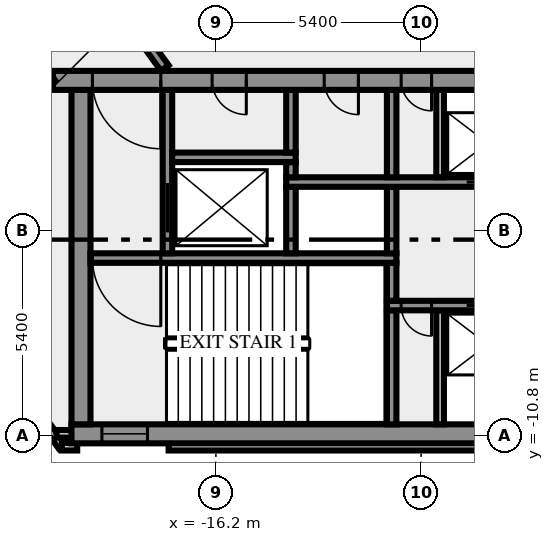
"""IFC4 building model, lengths in metres.
Left out: names, types, materials, properties, quantities, classifications, styles, units other than length and angle.
Written with IfcOpenShell. Run it as: python <this file> out.ifc"""

import sys

from ifc_helpers import new_model, si_unit, direction, frame, frame_2d, origin, place, context, subcontext, project, spatial, rectangle, extrude, element, fill, save


model = new_model("IFC4")
c1 = context("Model", 3, precision=1e-05, world=origin(), true_north=direction((0.0, 1.0)))
c2 = subcontext(c1, "Body", "Model", "MODEL_VIEW")
j1 = project(units=[si_unit("LENGTHUNIT", "METRE"), si_unit("PLANEANGLEUNIT", "RADIAN")], contexts=[c1])
p1 = place(None, origin())
s1 = spatial("IfcSite", under=j1, at=p1, CompositionType="ELEMENT")
p2 = place(p1, origin())
s2 = spatial("IfcBuilding", under=s1, at=p2, CompositionType="ELEMENT")
p3 = place(p2, frame((0.0, 0.0, 323.0)))
s3 = spatial("IfcBuildingStorey", under=s2, at=p3, CompositionType="ELEMENT", Elevation=323.0)
p4 = place(p3, frame((-21.833, -8.909, 0.0), z_axis=(0.0, 0.0, 1.0), x_axis=(0.587766567315, -0.809030569476, 0.0)))
e1 = element("IfcWall", 1, at=p4, inside=s3, PredefinedType="SOLIDWALL", context=c2, shape_type="SweptSolid", body=[
    extrude(rectangle(XDim=2.688, YDim=0.2, at=frame_2d((1.344, 0.0))), origin(), (0.0, 0.0, 1.0), 3.65),
])
p5 = place(p3, frame((-20.256, -11.088, 0.0), z_axis=(0.0, 0.0, 1.0), x_axis=(1.0, 0.0, 0.0)))
e2 = element("IfcWall", 2, at=p5, inside=s3, PredefinedType="SOLIDWALL", context=c2, shape_type="SweptSolid", body=[
    extrude(rectangle(XDim=0.406, YDim=0.2, at=frame_2d((0.203, 0.0))), origin(), (0.0, 0.0, 1.0), 3.65),
])
p6 = place(p3, frame((-17.444, -11.088, 0.0), z_axis=(0.0, 0.0, 1.0), x_axis=(1.0, 0.0, 0.0)))
e3 = element("IfcWall", 3, at=p6, inside=s3, PredefinedType="SOLIDWALL", context=c2, shape_type="SweptSolid", body=[
    extrude(rectangle(XDim=34.888, YDim=0.2, at=frame_2d((17.444, 0.0))), origin(), (0.0, 0.0, 1.0), 3.65),
])
p7 = place(p3, frame((-19.98, -10.75, 0.0), z_axis=(0.0, 0.0, 1.0), x_axis=(-1.0, 0.0, 0.0)))
e4 = element("IfcWall", 4, at=p7, inside=s3, PredefinedType="SOLIDWALL", context=c2, shape_type="SweptSolid", body=[
    extrude(rectangle(XDim=0.417, YDim=0.2, at=frame_2d((0.208, 0.0))), origin(), (0.0, 0.0, 1.0), 3.65),
])
p8 = place(p3, frame((-20.0, -10.75, 0.0), z_axis=(0.0, 0.0, 1.0), x_axis=(1.0, 0.0, 0.0)))
e5 = element("IfcWall", 5, at=p8, inside=s3, PredefinedType="SHEAR", context=c2, shape_type="SweptSolid", body=[
    extrude(rectangle(XDim=40.0, YDim=0.5, at=frame_2d((20.0, 0.0))), origin(), (0.0, 0.0, 1.0), 3.65),
])
p9 = place(p8, frame((0.8, 0.0, 1.0)))
e6 = element("IfcOpeningElement", 6, at=p9, cuts=e5, PredefinedType="OPENING", context=c2, shape_type="SweptSolid", body=[
    extrude(rectangle(XDim=1.2, YDim=1.2, at=frame_2d((0.6, 0.6))), frame((0.0, 0.26, 0.0), z_axis=(0.0, -1.0, 0.0), x_axis=(1.0, 0.0, 0.0)), (0.0, 0.0, 1.0), 0.52),
])
p10 = place(p8, frame((38.0, 0.0, 1.0)))
e7 = element("IfcOpeningElement", 7, at=p10, cuts=e5, PredefinedType="OPENING", context=c2, shape_type="SweptSolid", body=[
    extrude(rectangle(XDim=1.2, YDim=1.2, at=frame_2d((0.6, 0.6))), frame((0.0, 0.26, 0.0), z_axis=(0.0, -1.0, 0.0), x_axis=(1.0, 0.0, 0.0)), (0.0, 0.0, 1.0), 0.52),
])
p11 = place(p3, frame((-19.75, -10.5, 0.0), z_axis=(0.0, 0.0, 1.0), x_axis=(0.0, 1.0, 0.0)))
e8 = element("IfcWall", 8, at=p11, inside=s3, PredefinedType="SHEAR", context=c2, shape_type="SweptSolid", body=[
    extrude(rectangle(XDim=8.8, YDim=0.5, at=frame_2d((4.4, 0.0))), origin(), (0.0, 0.0, 1.0), 3.65),
])
p12 = place(p3, frame((-11.575, -10.5, 0.0), z_axis=(0.0, 0.0, 1.0), x_axis=(0.0, 1.0, 0.0)))
e9 = element("IfcWall", 9, at=p12, inside=s3, PredefinedType="SHEAR", context=c2, shape_type="SweptSolid", body=[
    extrude(rectangle(XDim=3.0, YDim=0.25, at=frame_2d((1.5, 0.0))), origin(), (0.0, 0.0, 1.0), 3.65),
])
p13 = place(p3, frame((-10.3, -10.5, 0.0), z_axis=(0.0, 0.0, 1.0), x_axis=(0.0, 1.0, 0.0)))
e10 = element("IfcWall", 10, at=p13, inside=s3, PredefinedType="SOLIDWALL", context=c2, shape_type="SweptSolid", body=[
    extrude(rectangle(XDim=3.0, YDim=0.2, at=frame_2d((1.5, 0.0))), origin(), (0.0, 0.0, 1.0), 3.65),
])
p14 = place(p3, frame((11.7, -7.375, 0.0), z_axis=(0.0, 0.0, 1.0), x_axis=(-1.0, 0.0, 0.0)))
e11 = element("IfcWall", 11, at=p14, inside=s3, PredefinedType="SHEAR", context=c2, shape_type="SweptSolid", body=[
    extrude(rectangle(XDim=23.4, YDim=0.25, at=frame_2d((11.7, 0.0))), origin(), (0.0, 0.0, 1.0), 3.65),
])
p15 = place(p14, frame((22.225, 0.0, 0.0)))
e12 = element("IfcOpeningElement", 12, at=p15, cuts=e11, PredefinedType="OPENING", context=c2, shape_type="SweptSolid", body=[
    extrude(rectangle(XDim=0.8, YDim=2.1, at=frame_2d((0.4, 1.05))), frame((0.0, 0.135, 0.0), z_axis=(0.0, -1.0, 0.0), x_axis=(1.0, 0.0, 0.0)), (0.0, 0.0, 1.0), 0.27),
])
p16 = place(p14, frame((20.2, 0.0, 0.0)))
e13 = element("IfcOpeningElement", 13, at=p16, cuts=e11, PredefinedType="OPENING", context=c2, shape_type="SweptSolid", body=[
    extrude(rectangle(XDim=1.1, YDim=2.1, at=frame_2d((0.55, 1.05))), frame((0.0, 0.135, 0.0), z_axis=(0.0, -1.0, 0.0), x_axis=(1.0, 0.0, 0.0)), (0.0, 0.0, 1.0), 0.27),
])
p17 = place(p14, frame((17.7, 0.0, 0.0)))
e14 = element("IfcOpeningElement", 14, at=p17, cuts=e11, PredefinedType="OPENING", context=c2, shape_type="SweptSolid", body=[
    extrude(rectangle(XDim=1.1, YDim=2.1, at=frame_2d((0.55, 1.05))), frame((0.0, 0.135, 0.0), z_axis=(0.0, -1.0, 0.0), x_axis=(1.0, 0.0, 0.0)), (0.0, 0.0, 1.0), 0.27),
])
p18 = place(p14, frame((15.975, 0.0, 0.0)))
e15 = element("IfcOpeningElement", 15, at=p18, cuts=e11, PredefinedType="OPENING", context=c2, shape_type="SweptSolid", body=[
    extrude(rectangle(XDim=0.8, YDim=2.1, at=frame_2d((0.4, 1.05))), frame((0.0, 0.135, 0.0), z_axis=(0.0, -1.0, 0.0), x_axis=(1.0, 0.0, 0.0)), (0.0, 0.0, 1.0), 0.27),
])
p19 = place(p14, frame((14.5, 0.0, 0.0)))
e16 = element("IfcOpeningElement", 16, at=p19, cuts=e11, PredefinedType="OPENING", context=c2, shape_type="SweptSolid", body=[
    extrude(rectangle(XDim=0.9, YDim=2.1, at=frame_2d((0.45, 1.05))), frame((0.0, 0.135, 0.0), z_axis=(0.0, -1.0, 0.0), x_axis=(1.0, 0.0, 0.0)), (0.0, 0.0, 1.0), 0.27),
])
p20 = place(p14, frame((12.95, 0.0, 0.0)))
e17 = element("IfcOpeningElement", 17, at=p20, cuts=e11, PredefinedType="OPENING", context=c2, shape_type="SweptSolid", body=[
    extrude(rectangle(XDim=0.9, YDim=2.1, at=frame_2d((0.45, 1.05))), frame((0.0, 0.135, 0.0), z_axis=(0.0, -1.0, 0.0), x_axis=(1.0, 0.0, 0.0)), (0.0, 0.0, 1.0), 0.27),
])
p21 = place(p14, frame((11.475, 0.0, 0.0)))
e18 = element("IfcOpeningElement", 18, at=p21, cuts=e11, PredefinedType="OPENING", context=c2, shape_type="SweptSolid", body=[
    extrude(rectangle(XDim=0.9, YDim=2.1, at=frame_2d((0.45, 1.05))), frame((0.0, 0.135, 0.0), z_axis=(0.0, -1.0, 0.0), x_axis=(1.0, 0.0, 0.0)), (0.0, 0.0, 1.0), 0.27),
])
p22 = place(p14, frame((10.45, 0.0, 0.0)))
e19 = element("IfcOpeningElement", 19, at=p22, cuts=e11, PredefinedType="OPENING", context=c2, shape_type="SweptSolid", body=[
    extrude(rectangle(XDim=0.5, YDim=2.1, at=frame_2d((0.25, 1.05))), frame((0.0, 0.135, 0.0), z_axis=(0.0, -1.0, 0.0), x_axis=(1.0, 0.0, 0.0)), (0.0, 0.0, 1.0), 0.27),
])
p23 = place(p14, frame((7.713, 0.0, 0.0)))
e20 = element("IfcOpeningElement", 20, at=p23, cuts=e11, PredefinedType="OPENING", context=c2, shape_type="SweptSolid", body=[
    extrude(rectangle(XDim=0.9, YDim=2.1, at=frame_2d((0.45, 1.05))), frame((0.0, 0.135, 0.0), z_axis=(0.0, -1.0, 0.0), x_axis=(1.0, 0.0, 0.0)), (0.0, 0.0, 1.0), 0.27),
])
p24 = place(p14, frame((4.15, 0.0, 0.0)))
e21 = element("IfcOpeningElement", 21, at=p24, cuts=e11, PredefinedType="OPENING", context=c2, shape_type="SweptSolid", body=[
    extrude(rectangle(XDim=0.9, YDim=2.1, at=frame_2d((0.45, 1.05))), frame((0.0, 0.135, 0.0), z_axis=(0.0, -1.0, 0.0), x_axis=(1.0, 0.0, 0.0)), (0.0, 0.0, 1.0), 0.27),
])
p25 = place(p14, frame((1.138, 0.0, 0.0)))
e22 = element("IfcOpeningElement", 22, at=p25, cuts=e11, PredefinedType="OPENING", context=c2, shape_type="SweptSolid", body=[
    extrude(rectangle(XDim=0.9, YDim=2.1, at=frame_2d((0.45, 1.05))), frame((0.0, 0.135, 0.0), z_axis=(0.0, -1.0, 0.0), x_axis=(1.0, 0.0, 0.0)), (0.0, 0.0, 1.0), 0.27),
])
p26 = place(p3, frame((-11.575, -7.25, 0.0), z_axis=(0.0, 0.0, 1.0), x_axis=(0.0, 1.0, 0.0)))
e23 = element("IfcWall", 23, at=p26, inside=s3, PredefinedType="SHEAR", context=c2, shape_type="SweptSolid", body=[
    extrude(rectangle(XDim=1.0, YDim=0.25, at=frame_2d((0.5, 0.0))), origin(), (0.0, 0.0, 1.0), 3.65),
])
p27 = place(p3, frame((-11.45, -6.125, 0.0), z_axis=(0.0, 0.0, 1.0), x_axis=(-1.0, 0.0, 0.0)))
e24 = element("IfcWall", 24, at=p27, inside=s3, PredefinedType="SHEAR", context=c2, shape_type="SweptSolid", body=[
    extrude(rectangle(XDim=8.05, YDim=0.25, at=frame_2d((4.025, 0.0))), origin(), (0.0, 0.0, 1.0), 3.65),
])
p28 = place(p27, frame((6.2, 0.0, 0.0)))
e25 = element("IfcOpeningElement", 25, at=p28, cuts=e24, PredefinedType="OPENING", context=c2, shape_type="SweptSolid", body=[
    extrude(rectangle(XDim=1.8, YDim=2.1, at=frame_2d((0.9, 1.05))), frame((0.0, 0.135, 0.0), z_axis=(0.0, -1.0, 0.0), x_axis=(1.0, 0.0, 0.0)), (0.0, 0.0, 1.0), 0.27),
])
p29 = place(p3, frame((-17.475, -6.0, 0.0), z_axis=(0.0, 0.0, 1.0), x_axis=(0.0, 1.0, 0.0)))
e26 = element("IfcWall", 26, at=p29, inside=s3, PredefinedType="SHEAR", context=c2, shape_type="SweptSolid", body=[
    extrude(rectangle(XDim=4.3, YDim=0.25, at=frame_2d((2.15, 0.0))), origin(), (0.0, 0.0, 1.0), 3.65),
])
p30 = place(p29, frame((0.55, 0.0, 0.0)))
e27 = element("IfcOpeningElement", 27, at=p30, cuts=e26, PredefinedType="OPENING", context=c2, shape_type="SweptSolid", body=[
    extrude(rectangle(XDim=1.3, YDim=2.1, at=frame_2d((0.65, 1.05))), frame((0.0, 0.135, 0.0), z_axis=(0.0, -1.0, 0.0), x_axis=(1.0, 0.0, 0.0)), (0.0, 0.0, 1.0), 0.27),
])
for number, where, z_axis, x_axis in (
    (28, (-14.225, -6.0, 0.0), (0.0, 0.0, 1.0), (0.0, 1.0, 0.0)),
    (29, (-11.575, -6.0, 0.0), (0.0, 0.0, 1.0), (0.0, 1.0, 0.0)),
):
    element("IfcWall", number, at=place(p3, frame(where, z_axis=z_axis, x_axis=x_axis)), inside=s3, PredefinedType="SHEAR", context=c2, shape_type="SweptSolid", body=[
        extrude(rectangle(XDim=1.75, YDim=0.25, at=frame_2d((0.875, 0.0))), origin(), (0.0, 0.0, 1.0), 3.65),
    ])
p31 = place(p3, frame((-14.35, -4.125, 0.0), z_axis=(0.0, 0.0, 1.0), x_axis=(1.0, 0.0, 0.0)))
e30 = element("IfcWall", 30, at=p31, inside=s3, PredefinedType="SHEAR", context=c2, shape_type="SweptSolid", body=[
    extrude(rectangle(XDim=10.4, YDim=0.25, at=frame_2d((5.2, 0.0))), origin(), (0.0, 0.0, 1.0), 3.65),
])
p32 = place(p31, frame((4.75, 0.0, 0.0)))
e31 = element("IfcOpeningElement", 31, at=p32, cuts=e30, PredefinedType="OPENING", context=c2, shape_type="SweptSolid", body=[
    extrude(rectangle(XDim=1.1, YDim=2.1, at=frame_2d((0.55, 1.05))), frame((0.0, 0.135, 0.0), z_axis=(0.0, -1.0, 0.0), x_axis=(1.0, 0.0, 0.0)), (0.0, 0.0, 1.0), 0.27),
])
p33 = place(p31, frame((7.25, 0.0, 0.0)))
e32 = element("IfcOpeningElement", 32, at=p33, cuts=e30, PredefinedType="OPENING", context=c2, shape_type="SweptSolid", body=[
    extrude(rectangle(XDim=1.1, YDim=2.1, at=frame_2d((0.55, 1.05))), frame((0.0, 0.135, 0.0), z_axis=(0.0, -1.0, 0.0), x_axis=(1.0, 0.0, 0.0)), (0.0, 0.0, 1.0), 0.27),
])
p34 = place(p3, frame((-14.225, -4.0, 0.0), z_axis=(0.0, 0.0, 1.0), x_axis=(0.0, 1.0, 0.0)))
e33 = element("IfcWall", 33, at=p34, inside=s3, PredefinedType="SHEAR", context=c2, shape_type="SweptSolid", body=[
    extrude(rectangle(XDim=0.4, YDim=0.25, at=frame_2d((0.2, 0.0))), origin(), (0.0, 0.0, 1.0), 3.65),
])
p35 = place(p3, frame((-11.575, -4.0, 0.0), z_axis=(0.0, 0.0, 1.0), x_axis=(0.0, 1.0, 0.0)))
e34 = element("IfcWall", 34, at=p35, inside=s3, PredefinedType="SHEAR", context=c2, shape_type="SweptSolid", body=[
    extrude(rectangle(XDim=2.3, YDim=0.25, at=frame_2d((1.15, 0.0))), origin(), (0.0, 0.0, 1.0), 3.65),
])
p36 = place(p3, frame((-10.3, -4.0, 0.0), z_axis=(0.0, 0.0, 1.0), x_axis=(0.0, 1.0, 0.0)))
e35 = element("IfcWall", 35, at=p36, inside=s3, PredefinedType="SOLIDWALL", context=c2, shape_type="SweptSolid", body=[
    extrude(rectangle(XDim=2.3, YDim=0.2, at=frame_2d((1.15, 0.0))), origin(), (0.0, 0.0, 1.0), 3.65),
])
p37 = place(p3, frame((-17.35, -3.475, 0.0), z_axis=(0.0, 0.0, 1.0), x_axis=(1.0, 0.0, 0.0)))
e36 = element("IfcWall", 36, at=p37, inside=s3, PredefinedType="SHEAR", context=c2, shape_type="SweptSolid", body=[
    extrude(rectangle(XDim=3.25, YDim=0.25, at=frame_2d((1.625, 0.0))), origin(), (0.0, 0.0, 1.0), 3.65),
])
p38 = place(p3, frame((-14.225, -3.35, 0.0), z_axis=(0.0, 0.0, 1.0), x_axis=(0.0, 1.0, 0.0)))
e37 = element("IfcWall", 37, at=p38, inside=s3, PredefinedType="SHEAR", context=c2, shape_type="SweptSolid", body=[
    extrude(rectangle(XDim=1.65, YDim=0.25, at=frame_2d((0.825, 0.0))), origin(), (0.0, 0.0, 1.0), 3.65),
])
p39 = place(p3, frame((20.49, -1.45, 0.0), z_axis=(0.0, 0.0, 1.0), x_axis=(-1.0, 0.0, 0.0)))
e38 = element("IfcWall", 38, at=p39, inside=s3, PredefinedType="SHEAR", context=c2, shape_type="SweptSolid", body=[
    extrude(rectangle(XDim=40.98, YDim=0.5, at=frame_2d((20.49, 0.0))), origin(), (0.0, 0.0, 1.0), 3.65),
])
p40 = place(p39, frame((38.14, 0.0, 0.0)))
e39 = element("IfcOpeningElement", 39, at=p40, cuts=e38, PredefinedType="OPENING", context=c2, shape_type="SweptSolid", body=[
    extrude(rectangle(XDim=1.8, YDim=2.1, at=frame_2d((0.9, 1.05))), frame((0.0, 0.26, 0.0), z_axis=(0.0, -1.0, 0.0), x_axis=(1.0, 0.0, 0.0)), (0.0, 0.0, 1.0), 0.52),
])
p41 = place(p39, frame((35.89, 0.0, 0.0)))
e40 = element("IfcOpeningElement", 40, at=p41, cuts=e38, PredefinedType="OPENING", context=c2, shape_type="SweptSolid", body=[
    extrude(rectangle(XDim=0.9, YDim=2.1, at=frame_2d((0.45, 1.05))), frame((0.0, 0.26, 0.0), z_axis=(0.0, -1.0, 0.0), x_axis=(1.0, 0.0, 0.0)), (0.0, 0.0, 1.0), 0.52),
])
p42 = place(p39, frame((32.94, 0.0, 0.0)))
e41 = element("IfcOpeningElement", 41, at=p42, cuts=e38, PredefinedType="OPENING", context=c2, shape_type="SweptSolid", body=[
    extrude(rectangle(XDim=0.9, YDim=2.1, at=frame_2d((0.45, 1.05))), frame((0.0, 0.26, 0.0), z_axis=(0.0, -1.0, 0.0), x_axis=(1.0, 0.0, 0.0)), (0.0, 0.0, 1.0), 0.52),
])
p43 = place(p39, frame((31.015, 0.0, 0.0)))
e42 = element("IfcOpeningElement", 42, at=p43, cuts=e38, PredefinedType="OPENING", context=c2, shape_type="SweptSolid", body=[
    extrude(rectangle(XDim=0.8, YDim=2.1, at=frame_2d((0.4, 1.05))), frame((0.0, 0.26, 0.0), z_axis=(0.0, -1.0, 0.0), x_axis=(1.0, 0.0, 0.0)), (0.0, 0.0, 1.0), 0.52),
])
p44 = place(p39, frame((24.765, 0.0, 0.0)))
e43 = element("IfcOpeningElement", 43, at=p44, cuts=e38, PredefinedType="OPENING", context=c2, shape_type="SweptSolid", body=[
    extrude(rectangle(XDim=0.8, YDim=2.1, at=frame_2d((0.4, 1.05))), frame((0.0, 0.26, 0.0), z_axis=(0.0, -1.0, 0.0), x_axis=(1.0, 0.0, 0.0)), (0.0, 0.0, 1.0), 0.52),
])
p45 = place(p39, frame((21.765, 0.0, 0.0)))
e44 = element("IfcOpeningElement", 44, at=p45, cuts=e38, PredefinedType="OPENING", context=c2, shape_type="SweptSolid", body=[
    extrude(rectangle(XDim=2.0, YDim=2.1, at=frame_2d((1.0, 1.05))), frame((0.0, 0.26, 0.0), z_axis=(0.0, -1.0, 0.0), x_axis=(1.0, 0.0, 0.0)), (0.0, 0.0, 1.0), 0.52),
])
p46 = place(p39, frame((15.103, 0.0, 0.0)))
e45 = element("IfcOpeningElement", 45, at=p46, cuts=e38, PredefinedType="OPENING", context=c2, shape_type="SweptSolid", body=[
    extrude(rectangle(XDim=0.9, YDim=2.1, at=frame_2d((0.45, 1.05))), frame((0.0, 0.26, 0.0), z_axis=(0.0, -1.0, 0.0), x_axis=(1.0, 0.0, 0.0)), (0.0, 0.0, 1.0), 0.52),
])
p47 = place(p39, frame((13.04, 0.0, 0.0)))
e46 = element("IfcOpeningElement", 46, at=p47, cuts=e38, PredefinedType="OPENING", context=c2, shape_type="SweptSolid", body=[
    extrude(rectangle(XDim=0.9, YDim=2.1, at=frame_2d((0.45, 1.05))), frame((0.0, 0.26, 0.0), z_axis=(0.0, -1.0, 0.0), x_axis=(1.0, 0.0, 0.0)), (0.0, 0.0, 1.0), 0.52),
])
p48 = place(p39, frame((10.177, 0.0, 0.0)))
e47 = element("IfcOpeningElement", 47, at=p48, cuts=e38, PredefinedType="OPENING", context=c2, shape_type="SweptSolid", body=[
    extrude(rectangle(XDim=0.9, YDim=2.1, at=frame_2d((0.45, 1.05))), frame((0.0, 0.26, 0.0), z_axis=(0.0, -1.0, 0.0), x_axis=(1.0, 0.0, 0.0)), (0.0, 0.0, 1.0), 0.52),
])
p49 = place(p39, frame((7.14, 0.0, 0.0)))
e48 = element("IfcOpeningElement", 48, at=p49, cuts=e38, PredefinedType="OPENING", context=c2, shape_type="SweptSolid", body=[
    extrude(rectangle(XDim=0.9, YDim=2.1, at=frame_2d((0.45, 1.05))), frame((0.0, 0.26, 0.0), z_axis=(0.0, -1.0, 0.0), x_axis=(1.0, 0.0, 0.0)), (0.0, 0.0, 1.0), 0.52),
])
p50 = place(p39, frame((5.028, 0.0, 0.0)))
e49 = element("IfcOpeningElement", 49, at=p50, cuts=e38, PredefinedType="OPENING", context=c2, shape_type="SweptSolid", body=[
    extrude(rectangle(XDim=0.8, YDim=2.1, at=frame_2d((0.4, 1.05))), frame((0.0, 0.26, 0.0), z_axis=(0.0, -1.0, 0.0), x_axis=(1.0, 0.0, 0.0)), (0.0, 0.0, 1.0), 0.52),
])
p51 = place(p39, frame((3.452, 0.0, 0.0)))
e50 = element("IfcOpeningElement", 50, at=p51, cuts=e38, PredefinedType="OPENING", context=c2, shape_type="SweptSolid", body=[
    extrude(rectangle(XDim=0.8, YDim=2.1, at=frame_2d((0.4, 1.05))), frame((0.0, 0.26, 0.0), z_axis=(0.0, -1.0, 0.0), x_axis=(1.0, 0.0, 0.0)), (0.0, 0.0, 1.0), 0.52),
])
p52 = place(p39, frame((1.04, 0.0, 0.0)))
e51 = element("IfcOpeningElement", 51, at=p52, cuts=e38, PredefinedType="OPENING", context=c2, shape_type="SweptSolid", body=[
    extrude(rectangle(XDim=1.8, YDim=2.1, at=frame_2d((0.9, 1.05))), frame((0.0, 0.26, 0.0), z_axis=(0.0, -1.0, 0.0), x_axis=(1.0, 0.0, 0.0)), (0.0, 0.0, 1.0), 0.52),
])
p53 = place(p3, frame((-20.531, -1.523, 0.0), z_axis=(0.0, 0.0, 1.0), x_axis=(-0.587782646447, 0.809018887626, 0.0)))
e52 = element("IfcWall", 52, at=p53, inside=s3, PredefinedType="SOLIDWALL", context=c2, shape_type="SweptSolid", body=[
    extrude(rectangle(XDim=11.27, YDim=0.25, at=frame_2d((5.635, 0.0))), origin(), (0.0, 0.0, 1.0), 3.65),
])
p54 = place(p53, frame((7.566, 0.0, 0.0)))
e53 = element("IfcOpeningElement", 53, at=p54, cuts=e52, PredefinedType="OPENING", context=c2, shape_type="SweptSolid", body=[
    extrude(rectangle(XDim=0.9, YDim=2.1, at=frame_2d((0.45, 1.05))), frame((0.0, 0.135, 0.0), z_axis=(0.0, -1.0, 0.0), x_axis=(1.0, 0.0, 0.0)), (0.0, 0.0, 1.0), 0.27),
])
p55 = place(p53, frame((9.165, 0.0, 0.0)))
e54 = element("IfcOpeningElement", 54, at=p55, cuts=e52, PredefinedType="OPENING", context=c2, shape_type="SweptSolid", body=[
    extrude(rectangle(XDim=0.9, YDim=2.1, at=frame_2d((0.45, 1.05))), frame((0.0, 0.135, 0.0), z_axis=(0.0, -1.0, 0.0), x_axis=(1.0, 0.0, 0.0)), (0.0, 0.0, 1.0), 0.27),
])
p56 = place(p3, frame((-24.865, 8.95, 0.0), z_axis=(0.0, 0.0, 1.0), x_axis=(0.587791617212, -0.809012369952, 0.0)))
e55 = element("IfcWall", 55, at=p56, inside=s3, PredefinedType="SOLIDWALL", context=c2, shape_type="SweptSolid", body=[
    extrude(rectangle(XDim=12.453, YDim=0.25, at=frame_2d((6.227, 0.0))), origin(), (0.0, 0.0, 1.0), 3.65),
])
p57 = place(p56, frame((8.112, 0.0, 0.0)))
e56 = element("IfcOpeningElement", 56, at=p57, cuts=e55, PredefinedType="OPENING", context=c2, shape_type="SweptSolid", body=[
    extrude(rectangle(XDim=0.9, YDim=2.1, at=frame_2d((0.45, 1.05))), frame((0.0, 0.135, 0.0), z_axis=(0.0, -1.0, 0.0), x_axis=(1.0, 0.0, 0.0)), (0.0, 0.0, 1.0), 0.27),
])
p58 = place(p9, origin())
e57 = element("IfcWindow", 57, at=p58, inside=s3, PartitioningType="SINGLE_PANEL", PredefinedType="WINDOW", context=c2, shape_type="SweptSolid", body=[
    extrude(rectangle(XDim=1.2, YDim=1.2, at=frame_2d((0.6, 0.6))), frame((0.0, 0.03, 0.0), z_axis=(0.0, -1.0, 0.0), x_axis=(1.0, 0.0, 0.0)), (0.0, 0.0, 1.0), 0.06),
])
fill(e6, e57)
p59 = place(p15, origin())
e58 = element("IfcDoor", 58, at=p59, inside=s3, OperationType="SINGLE_SWING_RIGHT", PredefinedType="DOOR", context=c2, shape_type="SweptSolid", body=[
    extrude(rectangle(XDim=0.8, YDim=2.1, at=frame_2d((0.4, 1.05))), frame((0.0, 0.025, 0.0), z_axis=(0.0, -1.0, 0.0), x_axis=(1.0, 0.0, 0.0)), (0.0, 0.0, 1.0), 0.05),
])
fill(e12, e58)
p60 = place(p16, origin())
e59 = element("IfcDoor", 59, at=p60, inside=s3, OperationType="DOUBLE_DOOR_SLIDING", PredefinedType="DOOR", context=c2, shape_type="SweptSolid", body=[
    extrude(rectangle(XDim=1.1, YDim=2.1, at=frame_2d((0.55, 1.05))), frame((0.0, 0.025, 0.0), z_axis=(0.0, -1.0, 0.0), x_axis=(1.0, 0.0, 0.0)), (0.0, 0.0, 1.0), 0.05),
])
fill(e13, e59)
p61 = place(p28, origin())
e60 = element("IfcDoor", 60, at=p61, inside=s3, OperationType="DOUBLE_DOOR_SINGLE_SWING", PredefinedType="DOOR", context=c2, shape_type="SweptSolid", body=[
    extrude(rectangle(XDim=1.8, YDim=2.1, at=frame_2d((0.9, 1.05))), frame((0.0, 0.025, 0.0), z_axis=(0.0, -1.0, 0.0), x_axis=(1.0, 0.0, 0.0)), (0.0, 0.0, 1.0), 0.05),
])
fill(e25, e60)
p62 = place(p30, origin())
e61 = element("IfcDoor", 61, at=p62, inside=s3, OperationType="DOUBLE_DOOR_SLIDING", PredefinedType="DOOR", context=c2, shape_type="SweptSolid", body=[
    extrude(rectangle(XDim=1.3, YDim=2.1, at=frame_2d((0.65, 1.05))), frame((0.0, 0.025, 0.0), z_axis=(0.0, -1.0, 0.0), x_axis=(1.0, 0.0, 0.0)), (0.0, 0.0, 1.0), 0.05),
])
fill(e27, e61)
p63 = place(p32, origin())
e62 = element("IfcDoor", 62, at=p63, inside=s3, OperationType="DOUBLE_DOOR_SLIDING", PredefinedType="DOOR", context=c2, shape_type="SweptSolid", body=[
    extrude(rectangle(XDim=1.1, YDim=2.1, at=frame_2d((0.55, 1.05))), frame((0.0, 0.025, 0.0), z_axis=(0.0, -1.0, 0.0), x_axis=(1.0, 0.0, 0.0)), (0.0, 0.0, 1.0), 0.05),
])
fill(e31, e62)
p64 = place(p40, origin())
e63 = element("IfcDoor", 63, at=p64, inside=s3, OperationType="DOUBLE_DOOR_SINGLE_SWING", PredefinedType="DOOR", context=c2, shape_type="SweptSolid", body=[
    extrude(rectangle(XDim=1.8, YDim=2.1, at=frame_2d((0.9, 1.05))), frame((0.0, 0.025, 0.0), z_axis=(0.0, -1.0, 0.0), x_axis=(1.0, 0.0, 0.0)), (0.0, 0.0, 1.0), 0.05),
])
fill(e39, e63)
p65 = place(p41, origin())
e64 = element("IfcDoor", 64, at=p65, inside=s3, OperationType="SINGLE_SWING_RIGHT", PredefinedType="DOOR", context=c2, shape_type="SweptSolid", body=[
    extrude(rectangle(XDim=0.9, YDim=2.1, at=frame_2d((0.45, 1.05))), frame((0.0, 0.025, 0.0), z_axis=(0.0, -1.0, 0.0), x_axis=(1.0, 0.0, 0.0)), (0.0, 0.0, 1.0), 0.05),
])
fill(e40, e64)
p66 = place(p42, origin())
e65 = element("IfcDoor", 65, at=p66, inside=s3, OperationType="SINGLE_SWING_RIGHT", PredefinedType="DOOR", context=c2, shape_type="SweptSolid", body=[
    extrude(rectangle(XDim=0.9, YDim=2.1, at=frame_2d((0.45, 1.05))), frame((0.0, 0.025, 0.0), z_axis=(0.0, -1.0, 0.0), x_axis=(1.0, 0.0, 0.0)), (0.0, 0.0, 1.0), 0.05),
])
fill(e41, e65)
p67 = place(p43, origin())
e66 = element("IfcDoor", 66, at=p67, inside=s3, OperationType="SINGLE_SWING_RIGHT", PredefinedType="DOOR", context=c2, shape_type="SweptSolid", body=[
    extrude(rectangle(XDim=0.8, YDim=2.1, at=frame_2d((0.4, 1.05))), frame((0.0, 0.025, 0.0), z_axis=(0.0, -1.0, 0.0), x_axis=(1.0, 0.0, 0.0)), (0.0, 0.0, 1.0), 0.05),
])
fill(e42, e66)
save(model, sys.argv[1])
